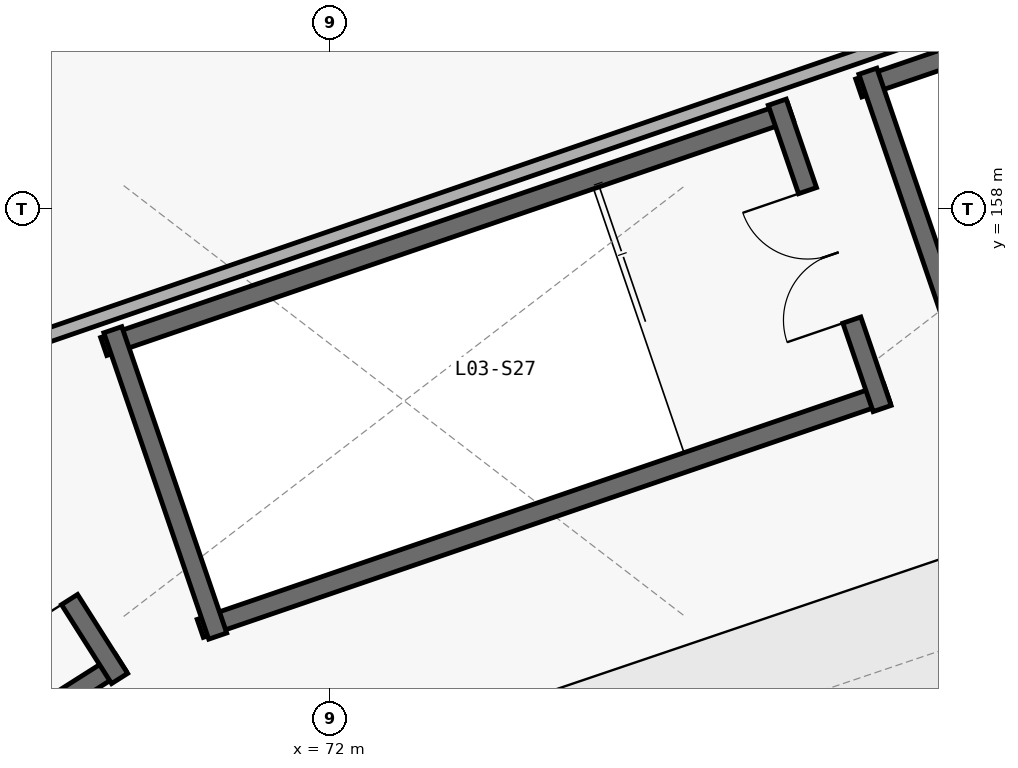
"""IFC4 building model, lengths in metres.
Left out: names, types, materials, properties, quantities, classifications, styles, units other than length and angle.
Written with IfcOpenShell. Run it as: python <this file> out.ifc"""

import sys

from ifc_helpers import new_model, si_unit, direction, frame, frame_2d, origin, place, context, subcontext, project, spatial, rectangle, extrude, element, fill, save


model = new_model("IFC4")
c1 = context("Model", 3, precision=1e-05, world=origin(), true_north=direction((0.0, 1.0)))
c2 = subcontext(c1, "Body", "Model", "MODEL_VIEW")
j1 = project(units=[si_unit("LENGTHUNIT", "METRE"), si_unit("PLANEANGLEUNIT", "RADIAN")], contexts=[c1])
p1 = place(None, origin())
s1 = spatial("IfcSite", under=j1, at=p1, CompositionType="ELEMENT")
p2 = place(p1, origin())
s2 = spatial("IfcBuilding", under=s1, at=p2, CompositionType="ELEMENT")
p3 = place(p2, frame((0.0, 0.0, 15.0)))
s3 = spatial("IfcBuildingStorey", under=s2, at=p3, CompositionType="ELEMENT", Elevation=15.0)
p4 = place(p3, frame((87.993, 162.686, 0.0), z_axis=(0.0, 0.0, 1.0), x_axis=(-0.946064424228, -0.323978556712, 0.0)))
e1 = element("IfcWall", 1, at=p4, inside=s3, PredefinedType="SHEAR", context=c2, shape_type="SweptSolid", body=[
    extrude(rectangle(XDim=9.55, YDim=0.25, at=frame_2d((4.775, 0.0))), origin(), (0.0, 0.0, 1.0), 4.54),
])
p5 = place(p3, frame((79.078, 159.812, 0.0), z_axis=(0.0, 0.0, 1.0), x_axis=(0.323971192516, -0.946066946056, 0.0)))
e2 = element("IfcWall", 2, at=p5, inside=s3, PredefinedType="SHEAR", context=c2, shape_type="SweptSolid", body=[
    extrude(rectangle(XDim=4.26, YDim=0.25, at=frame_2d((2.13, 0.0))), origin(), (0.0, 0.0, 1.0), 4.54),
])
p6 = place(p3, frame((61.183, 146.917, 0.0), z_axis=(0.0, 0.0, 1.0), x_axis=(0.844391246241, 0.535727004427, 0.0)))
e3 = element("IfcWall", 3, at=p6, inside=s3, PredefinedType="SHEAR", context=c2, shape_type="SweptSolid", body=[
    extrude(rectangle(XDim=9.55, YDim=0.25, at=frame_2d((4.775, 0.0))), origin(), (0.0, 0.0, 1.0), 4.54),
])
p7 = place(p3, frame((69.233, 151.823, 0.0), z_axis=(0.0, 0.0, 1.0), x_axis=(-0.535684577572, 0.844418162613, 0.0)))
e4 = element("IfcWall", 4, at=p7, inside=s3, PredefinedType="SHEAR", context=c2, shape_type="SweptSolid", body=[
    extrude(rectangle(XDim=4.26, YDim=0.25, at=frame_2d((2.13, 0.0))), origin(), (0.0, 0.0, 1.0), 4.54),
])
p8 = place(p7, frame((1.23, 0.0, 0.0)))
e5 = element("IfcOpeningElement", 5, at=p8, cuts=e4, PredefinedType="OPENING", context=c2, shape_type="SweptSolid", body=[
    extrude(rectangle(XDim=1.8, YDim=2.25, at=frame_2d((0.9, 1.125))), frame((0.0, 0.135, 0.0), z_axis=(0.0, -1.0, 0.0), x_axis=(1.0, 0.0, 0.0)), (0.0, 0.0, 1.0), 0.27),
])
for number, where, z_axis, x_axis in (
    (6, (78.059, 159.285, 0.0), (0.0, 0.0, 1.0), (-0.946, -0.324, 0.0)),
    (7, (70.294, 152.482, 0.0), (0.0, 0.0, 1.0), (0.946, 0.324, 0.0)),
):
    element("IfcWall", number, at=place(p3, frame(where, z_axis=z_axis, x_axis=x_axis)), inside=s3, PredefinedType="SHEAR", context=c2, shape_type="SweptSolid", body=[
        extrude(rectangle(XDim=9.55, YDim=0.25, at=frame_2d((4.775, 0.0))), origin(), (0.0, 0.0, 1.0), 4.54),
    ])
p9 = place(p3, frame((79.265, 155.375, 0.0), z_axis=(0.0, 0.0, 1.0), x_axis=(-0.323971192516, 0.946066946056, 0.0)))
e8 = element("IfcWall", 8, at=p9, inside=s3, PredefinedType="SHEAR", context=c2, shape_type="SweptSolid", body=[
    extrude(rectangle(XDim=4.26, YDim=0.25, at=frame_2d((2.13, 0.0))), origin(), (0.0, 0.0, 1.0), 4.54),
])
p10 = place(p9, frame((1.23, 0.0, 0.0)))
e9 = element("IfcOpeningElement", 9, at=p10, cuts=e8, PredefinedType="OPENING", context=c2, shape_type="SweptSolid", body=[
    extrude(rectangle(XDim=1.8, YDim=2.25, at=frame_2d((0.9, 1.125))), frame((0.0, 0.135, 0.0), z_axis=(0.0, -1.0, 0.0), x_axis=(1.0, 0.0, 0.0)), (0.0, 0.0, 1.0), 0.27),
])
p11 = place(p3, frame((69.144, 156.411, 0.0), z_axis=(0.0, 0.0, 1.0), x_axis=(0.323988758717, -0.946060930504, 0.0)))
e10 = element("IfcWall", 10, at=p11, inside=s3, PredefinedType="SHEAR", context=c2, shape_type="SweptSolid", body=[
    extrude(rectangle(XDim=4.26, YDim=0.25, at=frame_2d((2.13, 0.0))), origin(), (0.0, 0.0, 1.0), 4.54),
])
p12 = place(p3, frame((88.97, 163.459, 0.0), z_axis=(0.0, 0.0, 1.0), x_axis=(-0.945509956828, -0.32559318411, 0.0)))
e11 = element("IfcWall", 11, at=p12, inside=s3, PredefinedType="PARTITIONING", context=c2, shape_type="SweptSolid", body=[
    extrude(rectangle(XDim=22.697, YDim=0.18, at=frame_2d((11.348, 0.0))), origin(), (0.0, 0.0, 1.0), 3.665),
])
p13 = place(p8, origin())
e12 = element("IfcDoor", 12, at=p13, inside=s3, OperationType="DOUBLE_DOOR_SINGLE_SWING", PredefinedType="DOOR", context=c2, shape_type="SweptSolid", body=[
    extrude(rectangle(XDim=1.8, YDim=2.25, at=frame_2d((0.9, 1.125))), frame((0.0, 0.025, 0.0), z_axis=(0.0, -1.0, 0.0), x_axis=(1.0, 0.0, 0.0)), (0.0, 0.0, 1.0), 0.05),
])
fill(e5, e12)
p14 = place(p10, origin())
e13 = element("IfcDoor", 13, at=p14, inside=s3, OperationType="DOUBLE_DOOR_SINGLE_SWING", PredefinedType="DOOR", context=c2, shape_type="SweptSolid", body=[
    extrude(rectangle(XDim=1.8, YDim=2.25, at=frame_2d((0.9, 1.125))), frame((0.0, 0.025, 0.0), z_axis=(0.0, -1.0, 0.0), x_axis=(1.0, 0.0, 0.0)), (0.0, 0.0, 1.0), 0.05),
])
fill(e9, e13)
save(model, sys.argv[1])
